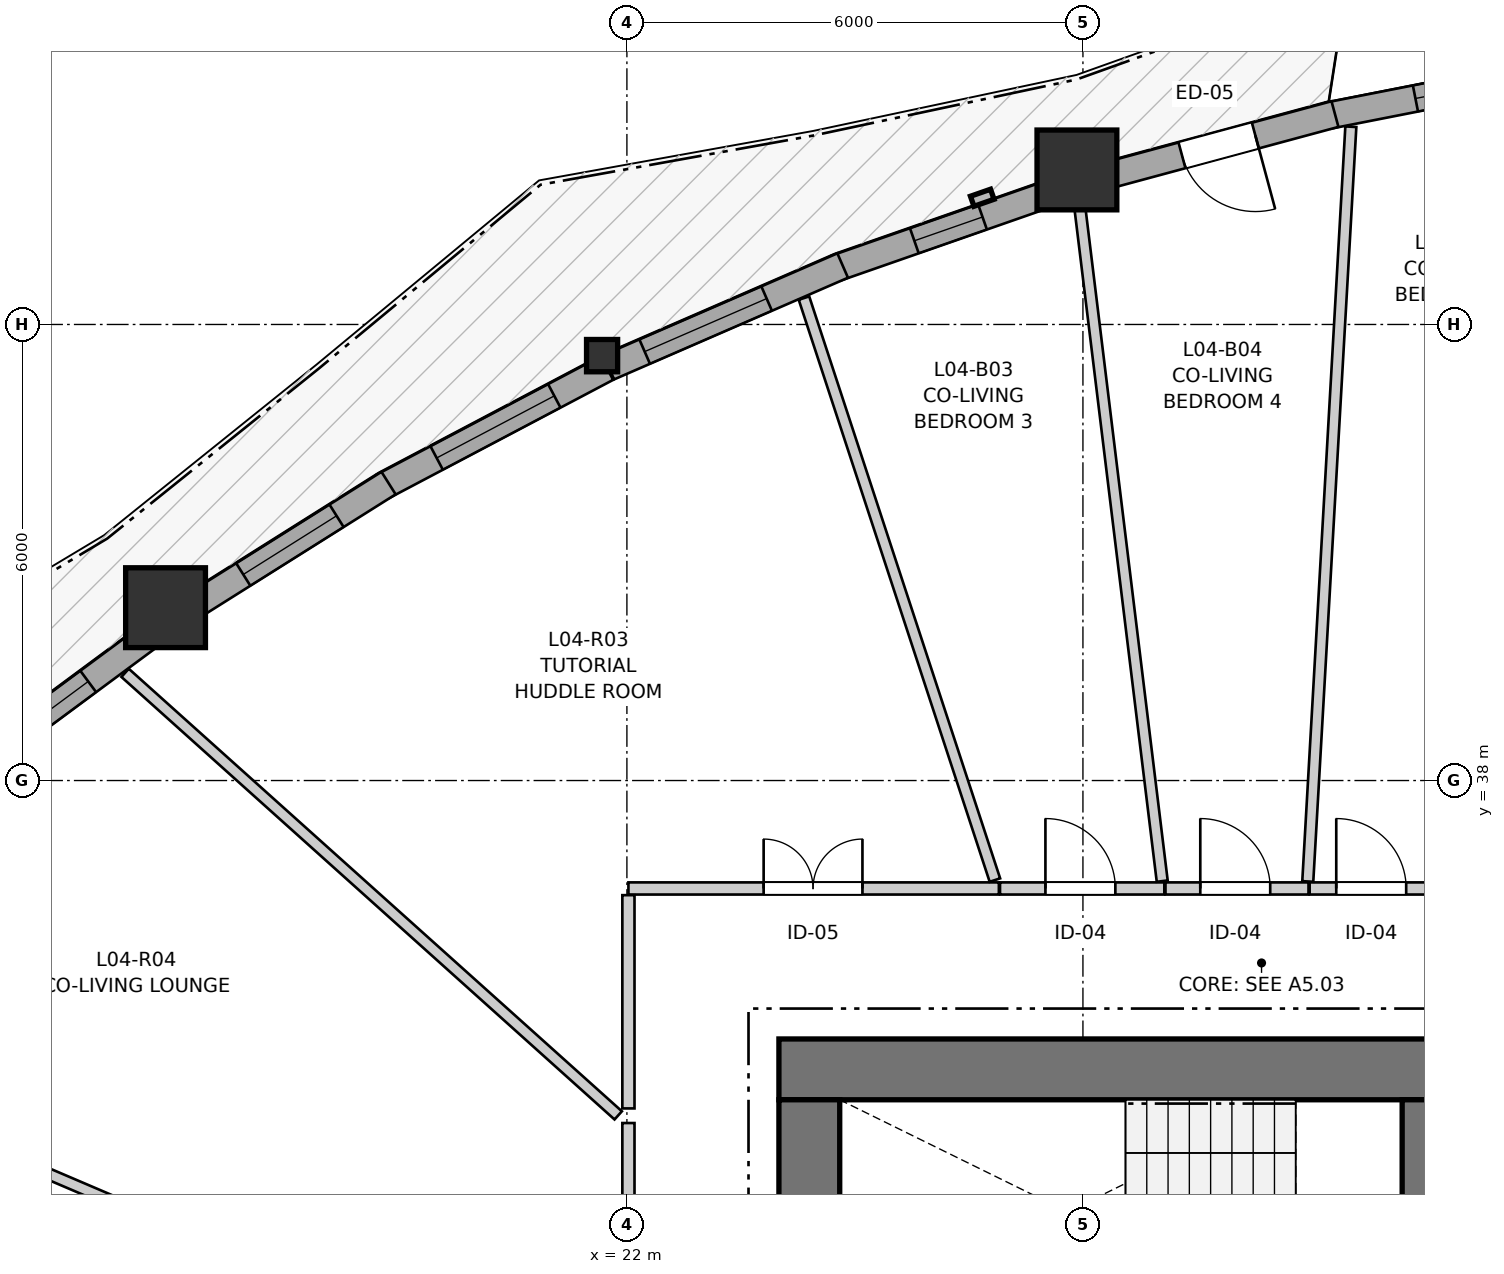
"""IFC4 building model, lengths in metres.
Left out: names, types, materials, properties, quantities, classifications, styles, units other than length and angle.
Written with IfcOpenShell. Run it as: python <this file> out.ifc"""

import sys

from ifc_helpers import new_model, si_unit, direction, frame, frame_2d, origin, origin_2d, place, context, subcontext, project, spatial, rectangle, i_section, extrude, source, transform, mapped, element, fill, save


model = new_model("IFC4")
c1 = context("Model", 3, precision=1e-05, world=origin(), true_north=direction((0.0, 1.0)))
c2 = subcontext(c1, "Body", "Model", "MODEL_VIEW")
j1 = project(units=[si_unit("LENGTHUNIT", "METRE"), si_unit("PLANEANGLEUNIT", "RADIAN")], contexts=[c1])
p1 = place(None, origin())
s1 = spatial("IfcSite", under=j1, at=p1, CompositionType="ELEMENT")
p2 = place(p1, origin())
s2 = spatial("IfcBuilding", under=s1, at=p2, CompositionType="ELEMENT")
p3 = place(p2, frame((0.0, 0.0, 17.4)))
s3 = spatial("IfcBuildingStorey", under=s2, at=p3, CompositionType="ELEMENT", Elevation=17.4)
p4 = place(p3, frame((36.7, 34.2, 0.0), z_axis=(0.0, 0.0, 1.0), x_axis=(-1.0, 0.0, 0.0)))
e1 = element("IfcWall", 1, at=p4, inside=s3, PredefinedType="SHEAR", context=c2, shape_type="SweptSolid", body=[
    extrude(rectangle(XDim=12.7, YDim=0.8, at=frame_2d((6.35, 0.0))), origin(), (0.0, 0.0, 1.0), 2.94),
])
p5 = place(p3, frame((24.4, 33.8, 0.0), z_axis=(0.0, 0.0, 1.0), x_axis=(0.0, -1.0, 0.0)))
e2 = element("IfcWall", 2, at=p5, inside=s3, PredefinedType="SHEAR", context=c2, shape_type="SweptSolid", body=[
    extrude(rectangle(XDim=15.6, YDim=0.8, at=frame_2d((7.8, 0.0))), origin(), (0.0, 0.0, 1.0), 2.94),
])
p6 = place(p5, frame((7.05, 0.0, 0.0)))
e3 = element("IfcOpeningElement", 3, at=p6, cuts=e2, PredefinedType="OPENING", context=c2, shape_type="SweptSolid", body=[
    extrude(rectangle(XDim=1.5, YDim=2.15, at=frame_2d((0.75, 1.075))), frame((0.0, 0.41, 0.0), z_axis=(0.0, -1.0, 0.0), x_axis=(1.0, 0.0, 0.0)), (0.0, 0.0, 1.0), 0.82),
])
p7 = place(p5, frame((3.52, 0.0, 0.0)))
e4 = element("IfcOpeningElement", 4, at=p7, cuts=e2, PredefinedType="OPENING", context=c2, shape_type="SweptSolid", body=[
    extrude(rectangle(XDim=0.86, YDim=2.05, at=frame_2d((0.43, 1.025))), frame((0.0, 0.41, 0.0), z_axis=(0.0, -1.0, 0.0), x_axis=(1.0, 0.0, 0.0)), (0.0, 0.0, 1.0), 0.82),
])
p8 = place(p5, frame((11.22, 0.0, 0.0)))
e5 = element("IfcOpeningElement", 5, at=p8, cuts=e2, PredefinedType="OPENING", context=c2, shape_type="SweptSolid", body=[
    extrude(rectangle(XDim=0.86, YDim=2.05, at=frame_2d((0.43, 1.025))), frame((0.0, 0.41, 0.0), z_axis=(0.0, -1.0, 0.0), x_axis=(1.0, 0.0, 0.0)), (0.0, 0.0, 1.0), 0.82),
])
p9 = place(p3, frame((32.4, 30.85, 0.0), z_axis=(0.0, 0.0, 1.0), x_axis=(0.0, 1.0, 0.0)))
e6 = element("IfcWall", 6, at=p9, inside=s3, PredefinedType="SHEAR", context=c2, shape_type="SweptSolid", body=[
    extrude(rectangle(XDim=2.95, YDim=0.4, at=frame_2d((1.475, 0.0))), origin(), (0.0, 0.0, 1.0), 2.94),
])
m1 = source(origin(), c2, "Body", "SweptSolid", [
    extrude(rectangle(XDim=1.05, YDim=1.05, at=origin_2d()), origin(), (0.0, 0.0, 1.0), 2.94),
])
p10 = place(p3, frame((27.921, 46.033, 0.0), z_axis=(0.0, 0.0, 1.0), x_axis=(1.0, 0.0, 0.0)))
e7 = element("IfcColumn", 7, at=p10, inside=s3, PredefinedType="COLUMN", context=c2, shape_type="MappedRepresentation", body=[
    mapped(m1, transform((0.0, 0.0, 0.0), x_axis=(1.0, 0.0, 0.0), y_axis=(0.0, 1.0, 0.0), z_axis=(0.0, 0.0, 1.0), scale=1.0)),
])
m2 = source(origin(), c2, "Body", "SweptSolid", [
    extrude(i_section(OverallWidth=0.409, OverallDepth=0.425, WebThickness=0.03, FlangeThickness=0.048, FilletRadius=0.015, at=origin_2d()), origin(), (0.0, 0.0, 1.0), 2.94),
])
p11 = place(p3, frame((21.673, 43.59, 0.0), z_axis=(0.0, 0.0, 1.0), x_axis=(1.0, 0.0, 0.0)))
e8 = element("IfcColumn", 8, at=p11, inside=s3, PredefinedType="PILASTER", context=c2, shape_type="MappedRepresentation", body=[
    mapped(m2, transform((0.0, 0.0, 0.0), x_axis=(1.0, 0.0, 0.0), y_axis=(0.0, 1.0, 0.0), z_axis=(0.0, 0.0, 1.0), scale=1.0)),
])
p12 = place(p3, frame((15.93, 40.274, 0.0), z_axis=(0.0, 0.0, 1.0), x_axis=(1.0, 0.0, 0.0)))
e9 = element("IfcColumn", 9, at=p12, inside=s3, PredefinedType="COLUMN", context=c2, shape_type="MappedRepresentation", body=[
    mapped(m1, transform((0.0, 0.0, 0.0), x_axis=(1.0, 0.0, 0.0), y_axis=(0.0, 1.0, 0.0), z_axis=(0.0, 0.0, 1.0), scale=1.0)),
])
p13 = place(p3, frame((34.687, 47.427, 0.0), z_axis=(0.0, 0.0, 1.0), x_axis=(-0.981220485855, -0.192889497219, 0.0)))
e10 = element("IfcWall", 10, at=p13, inside=s3, PredefinedType="SOLIDWALL", context=c2, shape_type="SweptSolid", body=[
    extrude(rectangle(XDim=3.522, YDim=0.35, at=frame_2d((1.761, 0.0))), origin(), (0.0, 0.0, 1.0), 2.42),
])
p14 = place(p13, frame((0.956, 0.0, 0.82)))
e11 = element("IfcOpeningElement", 11, at=p14, cuts=e10, PredefinedType="OPENING", context=c2, shape_type="SweptSolid", body=[
    extrude(rectangle(XDim=1.4, YDim=1.35, at=frame_2d((0.7, 0.675))), frame((0.0, 0.185, 0.0), z_axis=(0.0, -1.0, 0.0), x_axis=(1.0, 0.0, 0.0)), (0.0, 0.0, 1.0), 0.37),
])
p15 = place(p3, frame((31.316, 46.768, 0.0), z_axis=(0.0, 0.0, 1.0), x_axis=(-0.965446721184, -0.260600515261, 0.0)))
e12 = element("IfcWall", 12, at=p15, inside=s3, PredefinedType="SOLIDWALL", context=c2, shape_type="SweptSolid", body=[
    extrude(rectangle(XDim=3.169, YDim=0.35, at=frame_2d((1.585, 0.0))), origin(), (0.0, 0.0, 1.0), 2.42),
])
p16 = place(p15, frame((1.085, 0.0, 0.0)))
e13 = element("IfcOpeningElement", 13, at=p16, cuts=e12, PredefinedType="OPENING", context=c2, shape_type="SweptSolid", body=[
    extrude(rectangle(XDim=1.0, YDim=2.1, at=frame_2d((0.5, 1.05))), frame((0.0, 0.185, 0.0), z_axis=(0.0, -1.0, 0.0), x_axis=(1.0, 0.0, 0.0)), (0.0, 0.0, 1.0), 0.37),
])
p17 = place(p3, frame((27.695, 45.769, 0.0), z_axis=(0.0, 0.0, 1.0), x_axis=(-0.94414288081, -0.329536372221, 0.0)))
e14 = element("IfcWall", 14, at=p17, inside=s3, PredefinedType="SOLIDWALL", context=c2, shape_type="SweptSolid", body=[
    extrude(rectangle(XDim=3.113, YDim=0.35, at=frame_2d((1.557, 0.0))), origin(), (0.0, 0.0, 1.0), 2.42),
])
p18 = place(p17, frame((1.077, 0.0, 0.82)))
e15 = element("IfcOpeningElement", 15, at=p18, cuts=e14, PredefinedType="OPENING", context=c2, shape_type="SweptSolid", body=[
    extrude(rectangle(XDim=0.95, YDim=1.35, at=frame_2d((0.475, 0.675))), frame((0.0, 0.185, 0.0), z_axis=(0.0, -1.0, 0.0), x_axis=(1.0, 0.0, 0.0)), (0.0, 0.0, 1.0), 0.37),
])
p19 = place(p3, frame((24.839, 44.775, 0.0), z_axis=(0.0, 0.0, 1.0), x_axis=(-0.917081622701, -0.398699507529, 0.0)))
e16 = element("IfcWall", 16, at=p19, inside=s3, PredefinedType="SOLIDWALL", context=c2, shape_type="SweptSolid", body=[
    extrude(rectangle(XDim=3.356, YDim=0.35, at=frame_2d((1.678, 0.0))), origin(), (0.0, 0.0, 1.0), 2.42),
])
p20 = place(p19, frame((1.091, 0.0, 0.82)))
e17 = element("IfcOpeningElement", 17, at=p20, cuts=e16, PredefinedType="OPENING", context=c2, shape_type="SweptSolid", body=[
    extrude(rectangle(XDim=1.75, YDim=1.3, at=frame_2d((0.875, 0.65))), frame((0.0, 0.185, 0.0), z_axis=(0.0, -1.0, 0.0), x_axis=(1.0, 0.0, 0.0)), (0.0, 0.0, 1.0), 0.37),
])
p21 = place(p3, frame((21.737, 43.426, 0.0), z_axis=(0.0, 0.0, 1.0), x_axis=(-0.884406567815, -0.466717283595, 0.0)))
e18 = element("IfcWall", 18, at=p21, inside=s3, PredefinedType="SOLIDWALL", context=c2, shape_type="SweptSolid", body=[
    extrude(rectangle(XDim=3.336, YDim=0.35, at=frame_2d((1.668, 0.0))), origin(), (0.0, 0.0, 1.0), 2.42),
])
p22 = place(p21, frame((0.783, 0.0, 0.82)))
e19 = element("IfcOpeningElement", 19, at=p22, cuts=e18, PredefinedType="OPENING", context=c2, shape_type="SweptSolid", body=[
    extrude(rectangle(XDim=1.75, YDim=1.3, at=frame_2d((0.875, 0.65))), frame((0.0, 0.185, 0.0), z_axis=(0.0, -1.0, 0.0), x_axis=(1.0, 0.0, 0.0)), (0.0, 0.0, 1.0), 0.37),
])
p23 = place(p3, frame((18.864, 41.913, 0.0), z_axis=(0.0, 0.0, 1.0), x_axis=(-0.84643287852, -0.532495429239, 0.0)))
e20 = element("IfcWall", 20, at=p23, inside=s3, PredefinedType="SOLIDWALL", context=c2, shape_type="SweptSolid", body=[
    extrude(rectangle(XDim=3.056, YDim=0.35, at=frame_2d((1.528, 0.0))), origin(), (0.0, 0.0, 1.0), 2.42),
])
p24 = place(p23, frame((0.808, 0.0, 0.82)))
e21 = element("IfcOpeningElement", 21, at=p24, cuts=e20, PredefinedType="OPENING", context=c2, shape_type="SweptSolid", body=[
    extrude(rectangle(XDim=1.45, YDim=1.25, at=frame_2d((0.725, 0.625))), frame((0.0, 0.185, 0.0), z_axis=(0.0, -1.0, 0.0), x_axis=(1.0, 0.0, 0.0)), (0.0, 0.0, 1.0), 0.37),
])
p25 = place(p3, frame((15.793, 39.955, 0.0), z_axis=(0.0, 0.0, 1.0), x_axis=(-0.803813051054, -0.594881987419, 0.0)))
e22 = element("IfcWall", 22, at=p25, inside=s3, PredefinedType="SOLIDWALL", context=c2, shape_type="SweptSolid", body=[
    extrude(rectangle(XDim=3.075, YDim=0.35, at=frame_2d((1.538, 0.0))), origin(), (0.0, 0.0, 1.0), 2.42),
])
p26 = place(p25, frame((1.095, 0.0, 0.82)))
e23 = element("IfcOpeningElement", 23, at=p26, cuts=e22, PredefinedType="OPENING", context=c2, shape_type="SweptSolid", body=[
    extrude(rectangle(XDim=1.45, YDim=1.25, at=frame_2d((0.725, 0.625))), frame((0.0, 0.185, 0.0), z_axis=(0.0, -1.0, 0.0), x_axis=(1.0, 0.0, 0.0)), (0.0, 0.0, 1.0), 0.37),
])
p27 = place(p3, frame((22.02, 36.58, 0.0), z_axis=(0.0, 0.0, 1.0), x_axis=(1.0, 0.0, 0.0)))
e24 = element("IfcWall", 24, at=p27, inside=s3, PredefinedType="PARTITIONING", context=c2, shape_type="SweptSolid", body=[
    extrude(rectangle(XDim=4.874, YDim=0.16, at=frame_2d((2.437, 0.0))), origin(), (0.0, 0.0, 1.0), 2.548),
])
p28 = place(p27, frame((1.779, 0.0, 0.0)))
e25 = element("IfcOpeningElement", 25, at=p28, cuts=e24, PredefinedType="OPENING", context=c2, shape_type="SweptSolid", body=[
    extrude(rectangle(XDim=1.3, YDim=2.1, at=frame_2d((0.65, 1.05))), frame((0.0, 0.09, 0.0), z_axis=(0.0, -1.0, 0.0), x_axis=(1.0, 0.0, 0.0)), (0.0, 0.0, 1.0), 0.18),
])
p29 = place(p3, frame((22.02, 29.545, 0.0), z_axis=(0.0, 0.0, 1.0), x_axis=(0.0, 1.0, 0.0)))
e26 = element("IfcWall", 26, at=p29, inside=s3, PredefinedType="PARTITIONING", context=c2, shape_type="SweptSolid", body=[
    extrude(rectangle(XDim=3.949, YDim=0.16, at=frame_2d((1.975, 0.0))), origin(), (0.0, 0.0, 1.0), 2.94),
])
p30 = place(p29, frame((1.323, 0.0, 0.0)))
e27 = element("IfcOpeningElement", 27, at=p30, cuts=e26, PredefinedType="OPENING", context=c2, shape_type="SweptSolid", body=[
    extrude(rectangle(XDim=1.3, YDim=2.1, at=frame_2d((0.65, 1.05))), frame((0.0, 0.09, 0.0), z_axis=(0.0, -1.0, 0.0), x_axis=(1.0, 0.0, 0.0)), (0.0, 0.0, 1.0), 0.18),
])
p31 = place(p3, frame((26.909, 36.58, 0.0), z_axis=(0.0, 0.0, 1.0), x_axis=(1.0, 0.0, 0.0)))
e28 = element("IfcWall", 28, at=p31, inside=s3, PredefinedType="PARTITIONING", context=c2, shape_type="SweptSolid", body=[
    extrude(rectangle(XDim=2.162, YDim=0.16, at=frame_2d((1.081, 0.0))), origin(), (0.0, 0.0, 1.0), 2.94),
])
p32 = place(p31, frame((0.597, 0.0, 0.0)))
e29 = element("IfcOpeningElement", 29, at=p32, cuts=e28, PredefinedType="OPENING", context=c2, shape_type="SweptSolid", body=[
    extrude(rectangle(XDim=0.92, YDim=2.1, at=frame_2d((0.46, 1.05))), frame((0.0, 0.09, 0.0), z_axis=(0.0, -1.0, 0.0), x_axis=(1.0, 0.0, 0.0)), (0.0, 0.0, 1.0), 0.18),
])
p33 = place(p3, frame((29.086, 36.58, 0.0), z_axis=(0.0, 0.0, 1.0), x_axis=(1.0, 0.0, 0.0)))
e30 = element("IfcWall", 30, at=p33, inside=s3, PredefinedType="PARTITIONING", context=c2, shape_type="SweptSolid", body=[
    extrude(rectangle(XDim=1.882, YDim=0.16, at=frame_2d((0.941, 0.0))), origin(), (0.0, 0.0, 1.0), 2.94),
])
p34 = place(p33, frame((0.458, 0.0, 0.0)))
e31 = element("IfcOpeningElement", 31, at=p34, cuts=e30, PredefinedType="OPENING", context=c2, shape_type="SweptSolid", body=[
    extrude(rectangle(XDim=0.92, YDim=2.1, at=frame_2d((0.46, 1.05))), frame((0.0, 0.09, 0.0), z_axis=(0.0, -1.0, 0.0), x_axis=(1.0, 0.0, 0.0)), (0.0, 0.0, 1.0), 0.18),
])
p35 = place(p3, frame((30.983, 36.58, 0.0), z_axis=(0.0, 0.0, 1.0), x_axis=(1.0, 0.0, 0.0)))
e32 = element("IfcWall", 32, at=p35, inside=s3, PredefinedType="PARTITIONING", context=c2, shape_type="SweptSolid", body=[
    extrude(rectangle(XDim=1.665, YDim=0.16, at=frame_2d((0.833, 0.0))), origin(), (0.0, 0.0, 1.0), 2.94),
])
p36 = place(p35, frame((0.35, 0.0, 0.0)))
e33 = element("IfcOpeningElement", 33, at=p36, cuts=e32, PredefinedType="OPENING", context=c2, shape_type="SweptSolid", body=[
    extrude(rectangle(XDim=0.92, YDim=2.1, at=frame_2d((0.46, 1.05))), frame((0.0, 0.09, 0.0), z_axis=(0.0, -1.0, 0.0), x_axis=(1.0, 0.0, 0.0)), (0.0, 0.0, 1.0), 0.18),
])
p37 = place(p3, frame((9.869, 34.757, 0.0), z_axis=(0.0, 0.0, 1.0), x_axis=(0.919492001568, -0.393108711493, 0.0)))
e34 = element("IfcWall", 34, at=p37, inside=s3, PredefinedType="PARTITIONING", context=c2, shape_type="SweptSolid", body=[
    extrude(rectangle(XDim=13.089, YDim=0.145, at=frame_2d((6.544, 0.0))), origin(), (0.0, 0.0, 1.0), 2.94),
])
p38 = place(p3, frame((30.958, 36.672, 0.0), z_axis=(0.0, 0.0, 1.0), x_axis=(0.056976385457, 0.998375526293, 0.0)))
e35 = element("IfcWall", 35, at=p38, inside=s3, PredefinedType="PARTITIONING", context=c2, shape_type="SweptSolid", body=[
    extrude(rectangle(XDim=9.945, YDim=0.145, at=frame_2d((4.973, 0.0))), origin(), (0.0, 0.0, 1.0), 2.94),
])
p39 = place(p3, frame((27.942, 45.68, 0.0), z_axis=(0.0, 0.0, 1.0), x_axis=(0.12142050141, -0.992601159498, 0.0)))
e36 = element("IfcWall", 36, at=p39, inside=s3, PredefinedType="PARTITIONING", context=c2, shape_type="SweptSolid", body=[
    extrude(rectangle(XDim=9.07, YDim=0.145, at=frame_2d((4.535, 0.0))), origin(), (0.0, 0.0, 1.0), 2.308),
])
p40 = place(p3, frame((15.398, 39.417, 0.0), z_axis=(0.0, 0.0, 1.0), x_axis=(0.744248709075, -0.667902581998, 0.0)))
e37 = element("IfcWall", 37, at=p40, inside=s3, PredefinedType="PARTITIONING", context=c2, shape_type="SweptSolid", body=[
    extrude(rectangle(XDim=8.717, YDim=0.145, at=frame_2d((4.359, 0.0))), origin(), (0.0, 0.0, 1.0), 2.94),
])
p41 = place(p3, frame((24.33, 44.347, 0.0), z_axis=(0.0, 0.0, 1.0), x_axis=(0.311716142238, -0.950175271552, 0.0)))
e38 = element("IfcWall", 38, at=p41, inside=s3, PredefinedType="PARTITIONING", context=c2, shape_type="SweptSolid", body=[
    extrude(rectangle(XDim=8.059, YDim=0.145, at=frame_2d((4.029, 0.0))), origin(), (0.0, 0.0, 1.0), 2.94),
])
p42 = place(p3, frame((22.02, 33.686, 0.0), z_axis=(0.0, 0.0, 1.0), x_axis=(0.0, 1.0, 0.0)))
e39 = element("IfcWall", 39, at=p42, inside=s3, PredefinedType="PARTITIONING", context=c2, shape_type="SweptSolid", body=[
    extrude(rectangle(XDim=2.806, YDim=0.16, at=frame_2d((1.403, 0.0))), origin(), (0.0, 0.0, 1.0), 2.94),
])
m3 = source(origin(), c2, "Body", "SweptSolid", [
    extrude(rectangle(XDim=1.4, YDim=1.35, at=frame_2d((0.7, 0.675))), frame((0.0, 0.03, 0.0), z_axis=(0.0, -1.0, 0.0), x_axis=(1.0, 0.0, 0.0)), (0.0, 0.0, 1.0), 0.06),
])
p43 = place(p14, origin())
e40 = element("IfcWindow", 40, at=p43, inside=s3, PartitioningType="SINGLE_PANEL", PredefinedType="WINDOW", context=c2, shape_type="MappedRepresentation", body=[
    mapped(m3, transform((0.0, 0.0, 0.0), x_axis=(1.0, 0.0, 0.0), y_axis=(0.0, 1.0, 0.0), z_axis=(0.0, 0.0, 1.0), scale=1.0)),
])
fill(e11, e40)
m4 = source(origin(), c2, "Body", "SweptSolid", [
    extrude(rectangle(XDim=0.95, YDim=1.35, at=frame_2d((0.475, 0.675))), frame((0.0, 0.03, 0.0), z_axis=(0.0, -1.0, 0.0), x_axis=(1.0, 0.0, 0.0)), (0.0, 0.0, 1.0), 0.06),
])
p44 = place(p18, origin())
e41 = element("IfcWindow", 41, at=p44, inside=s3, PartitioningType="SINGLE_PANEL", PredefinedType="WINDOW", context=c2, shape_type="MappedRepresentation", body=[
    mapped(m4, transform((0.0, 0.0, 0.0), x_axis=(1.0, 0.0, 0.0), y_axis=(0.0, 1.0, 0.0), z_axis=(0.0, 0.0, 1.0), scale=1.0)),
])
fill(e15, e41)
m5 = source(origin(), c2, "Body", "SweptSolid", [
    extrude(rectangle(XDim=1.75, YDim=1.3, at=frame_2d((0.875, 0.65))), frame((0.0, 0.03, 0.0), z_axis=(0.0, -1.0, 0.0), x_axis=(1.0, 0.0, 0.0)), (0.0, 0.0, 1.0), 0.06),
])
p45 = place(p20, origin())
e42 = element("IfcWindow", 42, at=p45, inside=s3, PartitioningType="SINGLE_PANEL", PredefinedType="WINDOW", context=c2, shape_type="MappedRepresentation", body=[
    mapped(m5, transform((0.0, 0.0, 0.0), x_axis=(1.0, 0.0, 0.0), y_axis=(0.0, 1.0, 0.0), z_axis=(0.0, 0.0, 1.0), scale=1.0)),
])
fill(e17, e42)
p46 = place(p22, origin())
e43 = element("IfcWindow", 43, at=p46, inside=s3, PartitioningType="SINGLE_PANEL", PredefinedType="WINDOW", context=c2, shape_type="MappedRepresentation", body=[
    mapped(m5, transform((0.0, 0.0, 0.0), x_axis=(1.0, 0.0, 0.0), y_axis=(0.0, 1.0, 0.0), z_axis=(0.0, 0.0, 1.0), scale=1.0)),
])
fill(e19, e43)
m6 = source(origin(), c2, "Body", "SweptSolid", [
    extrude(rectangle(XDim=1.45, YDim=1.25, at=frame_2d((0.725, 0.625))), frame((0.0, 0.03, 0.0), z_axis=(0.0, -1.0, 0.0), x_axis=(1.0, 0.0, 0.0)), (0.0, 0.0, 1.0), 0.06),
])
p47 = place(p24, origin())
e44 = element("IfcWindow", 44, at=p47, inside=s3, PartitioningType="SINGLE_PANEL", PredefinedType="WINDOW", context=c2, shape_type="MappedRepresentation", body=[
    mapped(m6, transform((0.0, 0.0, 0.0), x_axis=(1.0, 0.0, 0.0), y_axis=(0.0, 1.0, 0.0), z_axis=(0.0, 0.0, 1.0), scale=1.0)),
])
fill(e21, e44)
p48 = place(p26, origin())
e45 = element("IfcWindow", 45, at=p48, inside=s3, PartitioningType="SINGLE_PANEL", PredefinedType="WINDOW", context=c2, shape_type="MappedRepresentation", body=[
    mapped(m6, transform((0.0, 0.0, 0.0), x_axis=(1.0, 0.0, 0.0), y_axis=(0.0, 1.0, 0.0), z_axis=(0.0, 0.0, 1.0), scale=1.0)),
])
fill(e23, e45)
m7 = source(origin(), c2, "Body", "SweptSolid", [
    extrude(rectangle(XDim=1.0, YDim=2.1, at=frame_2d((0.5, 1.05))), frame((0.0, 0.025, 0.0), z_axis=(0.0, -1.0, 0.0), x_axis=(1.0, 0.0, 0.0)), (0.0, 0.0, 1.0), 0.05),
])
p49 = place(p16, origin())
e46 = element("IfcDoor", 46, at=p49, inside=s3, OperationType="SINGLE_SWING_LEFT", PredefinedType="DOOR", context=c2, shape_type="MappedRepresentation", body=[
    mapped(m7, transform((0.0, 0.0, 0.0), x_axis=(1.0, 0.0, 0.0), y_axis=(0.0, 1.0, 0.0), z_axis=(0.0, 0.0, 1.0), scale=1.0)),
])
fill(e13, e46)
m8 = source(origin(), c2, "Body", "SweptSolid", [
    extrude(rectangle(XDim=1.3, YDim=2.1, at=frame_2d((0.65, 1.05))), frame((0.0, 0.025, 0.0), z_axis=(0.0, -1.0, 0.0), x_axis=(1.0, 0.0, 0.0)), (0.0, 0.0, 1.0), 0.05),
])
p50 = place(p28, origin())
e47 = element("IfcDoor", 47, at=p50, inside=s3, OperationType="DOUBLE_DOOR_SINGLE_SWING", PredefinedType="DOOR", context=c2, shape_type="MappedRepresentation", body=[
    mapped(m8, transform((0.0, 0.0, 0.0), x_axis=(1.0, 0.0, 0.0), y_axis=(0.0, 1.0, 0.0), z_axis=(0.0, 0.0, 1.0), scale=1.0)),
])
fill(e25, e47)
m9 = source(origin(), c2, "Body", "SweptSolid", [
    extrude(rectangle(XDim=0.92, YDim=2.1, at=frame_2d((0.46, 1.05))), frame((0.0, 0.025, 0.0), z_axis=(0.0, -1.0, 0.0), x_axis=(1.0, 0.0, 0.0)), (0.0, 0.0, 1.0), 0.05),
])
p51 = place(p32, origin())
e48 = element("IfcDoor", 48, at=p51, inside=s3, OperationType="SINGLE_SWING_LEFT", PredefinedType="DOOR", context=c2, shape_type="MappedRepresentation", body=[
    mapped(m9, transform((0.0, 0.0, 0.0), x_axis=(1.0, 0.0, 0.0), y_axis=(0.0, 1.0, 0.0), z_axis=(0.0, 0.0, 1.0), scale=1.0)),
])
fill(e29, e48)
p52 = place(p34, origin())
e49 = element("IfcDoor", 49, at=p52, inside=s3, OperationType="SINGLE_SWING_LEFT", PredefinedType="DOOR", context=c2, shape_type="MappedRepresentation", body=[
    mapped(m9, transform((0.0, 0.0, 0.0), x_axis=(1.0, 0.0, 0.0), y_axis=(0.0, 1.0, 0.0), z_axis=(0.0, 0.0, 1.0), scale=1.0)),
])
fill(e31, e49)
p53 = place(p36, origin())
e50 = element("IfcDoor", 50, at=p53, inside=s3, OperationType="SINGLE_SWING_LEFT", PredefinedType="DOOR", context=c2, shape_type="MappedRepresentation", body=[
    mapped(m9, transform((0.0, 0.0, 0.0), x_axis=(1.0, 0.0, 0.0), y_axis=(0.0, 1.0, 0.0), z_axis=(0.0, 0.0, 1.0), scale=1.0)),
])
fill(e33, e50)
save(model, sys.argv[1])
